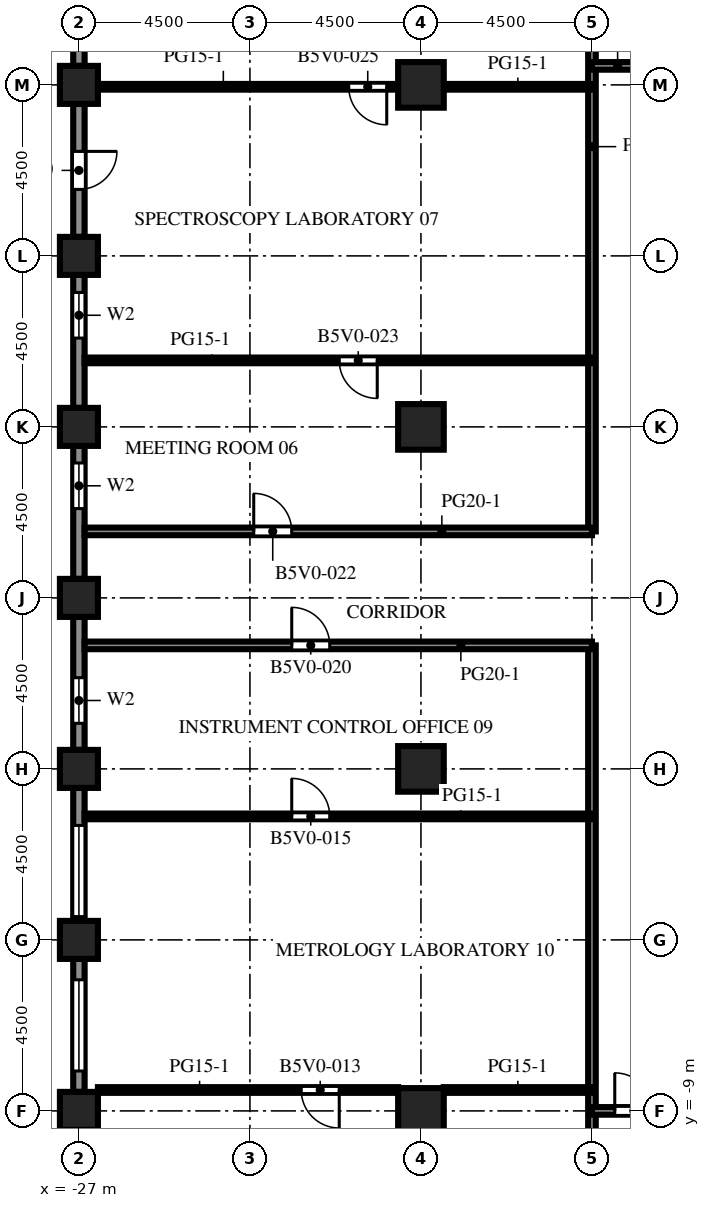
"""IFC4 building model, lengths in metres.
Left out: names, types, materials, properties, quantities, classifications, styles, units other than length and angle.
Written with IfcOpenShell. Run it as: python <this file> out.ifc"""

import sys

from ifc_helpers import new_model, si_unit, direction, frame, frame_2d, origin, origin_2d, place, context, subcontext, project, spatial, rectangle, extrude, element, fill, save


model = new_model("IFC4")
c1 = context("Model", 3, precision=1e-05, world=origin(), true_north=direction((0.0, 1.0)))
c2 = subcontext(c1, "Body", "Model", "MODEL_VIEW")
j1 = project(units=[si_unit("LENGTHUNIT", "METRE"), si_unit("PLANEANGLEUNIT", "RADIAN")], contexts=[c1])
p1 = place(None, origin())
s1 = spatial("IfcSite", under=j1, at=p1, CompositionType="ELEMENT")
p2 = place(p1, origin())
s2 = spatial("IfcBuilding", under=s1, at=p2, CompositionType="ELEMENT")
p3 = place(p2, frame((0.0, 0.0, 160.9)))
s3 = spatial("IfcBuildingStorey", under=s2, at=p3, CompositionType="ELEMENT", Elevation=160.9)
for number, where, z_axis, x_axis in (
    (1, (-27.0, -9.0, 0.0), (0.0, 0.0, 1.0), (1.0, 0.0, 0.0)),
    (2, (-27.0, -4.5, 0.0), (0.0, 0.0, 1.0), (1.0, 0.0, 0.0)),
    (3, (-27.0, 0.0, 0.0), (0.0, 0.0, 1.0), (1.0, 0.0, 0.0)),
    (4, (-27.0, 4.5, 0.0), (0.0, 0.0, 1.0), (1.0, 0.0, 0.0)),
    (5, (-27.0, 9.0, 0.0), (0.0, 0.0, 1.0), (1.0, 0.0, 0.0)),
    (6, (-27.0, 13.5, 0.0), (0.0, 0.0, 1.0), (1.0, 0.0, 0.0)),
    (7, (-27.0, 18.0, 0.0), (0.0, 0.0, 1.0), (1.0, 0.0, 0.0)),
):
    element("IfcColumn", number, at=place(p3, frame(where, z_axis=z_axis, x_axis=x_axis)), inside=s3, PredefinedType="COLUMN", context=c2, shape_type="SweptSolid", body=[
        extrude(rectangle(XDim=1.0, YDim=1.0, at=origin_2d()), origin(), (0.0, 0.0, 1.0), 4.1),
    ])
for number, where, z_axis, x_axis in (
    (8, (-18.0, -9.0, 0.0), (0.0, 0.0, 1.0), (1.0, 0.0, 0.0)),
    (9, (-18.0, 0.0, 0.0), (0.0, 0.0, 1.0), (1.0, 0.0, 0.0)),
    (10, (-18.0, 9.0, 0.0), (0.0, 0.0, 1.0), (1.0, 0.0, 0.0)),
    (11, (-18.0, 18.0, 0.0), (0.0, 0.0, 1.0), (1.0, 0.0, 0.0)),
):
    element("IfcColumn", number, at=place(p3, frame(where, z_axis=z_axis, x_axis=x_axis)), inside=s3, PredefinedType="COLUMN", context=c2, shape_type="SweptSolid", body=[
        extrude(rectangle(XDim=1.2, YDim=1.2, at=origin_2d()), origin(), (0.0, 0.0, 1.0), 4.1),
    ])
p4 = place(p3, frame((-27.0, 18.5, 0.0), z_axis=(0.0, 0.0, 1.0), x_axis=(0.0, 1.0, 0.0)))
e12 = element("IfcWall", 12, at=p4, inside=s3, PredefinedType="SOLIDWALL", context=c2, shape_type="SweptSolid", body=[
    extrude(rectangle(XDim=3.5, YDim=0.3, at=frame_2d((1.75, 0.0))), origin(), (0.0, 0.0, 1.0), 2.85),
])
p5 = place(p4, frame((0.55, 0.0, 0.8)))
e13 = element("IfcOpeningElement", 13, at=p5, cuts=e12, PredefinedType="OPENING", context=c2, shape_type="SweptSolid", body=[
    extrude(rectangle(XDim=2.4, YDim=1.7, at=frame_2d((1.2, 0.85))), frame((0.0, 0.16, 0.0), z_axis=(0.0, -1.0, 0.0), x_axis=(1.0, 0.0, 0.0)), (0.0, 0.0, 1.0), 0.32),
])
p6 = place(p3, frame((-27.0, 14.0, 0.0), z_axis=(0.0, 0.0, 1.0), x_axis=(0.0, 1.0, 0.0)))
e14 = element("IfcWall", 14, at=p6, inside=s3, PredefinedType="SOLIDWALL", context=c2, shape_type="SweptSolid", body=[
    extrude(rectangle(XDim=3.5, YDim=0.3, at=frame_2d((1.75, 0.0))), origin(), (0.0, 0.0, 1.0), 2.85),
])
p7 = place(p6, frame((1.25, 0.0, 0.0)))
e15 = element("IfcOpeningElement", 15, at=p7, cuts=e14, PredefinedType="OPENING", context=c2, shape_type="SweptSolid", body=[
    extrude(rectangle(XDim=1.0, YDim=2.2, at=frame_2d((0.5, 1.1))), frame((0.0, 0.16, 0.0), z_axis=(0.0, -1.0, 0.0), x_axis=(1.0, 0.0, 0.0)), (0.0, 0.0, 1.0), 0.32),
])
p8 = place(p3, frame((-27.0, 9.5, 0.0), z_axis=(0.0, 0.0, 1.0), x_axis=(0.0, 1.0, 0.0)))
e16 = element("IfcWall", 16, at=p8, inside=s3, PredefinedType="SOLIDWALL", context=c2, shape_type="SweptSolid", body=[
    extrude(rectangle(XDim=3.5, YDim=0.3, at=frame_2d((1.75, 0.0))), origin(), (0.0, 0.0, 1.0), 2.85),
])
p9 = place(p8, frame((1.837, 0.0, 0.8)))
e17 = element("IfcOpeningElement", 17, at=p9, cuts=e16, PredefinedType="OPENING", context=c2, shape_type="SweptSolid", body=[
    extrude(rectangle(XDim=1.2, YDim=1.7, at=frame_2d((0.6, 0.85))), frame((0.0, 0.16, 0.0), z_axis=(0.0, -1.0, 0.0), x_axis=(1.0, 0.0, 0.0)), (0.0, 0.0, 1.0), 0.32),
])
p10 = place(p3, frame((-27.0, 5.0, 0.0), z_axis=(0.0, 0.0, 1.0), x_axis=(0.0, 1.0, 0.0)))
e18 = element("IfcWall", 18, at=p10, inside=s3, PredefinedType="SOLIDWALL", context=c2, shape_type="SweptSolid", body=[
    extrude(rectangle(XDim=3.5, YDim=0.3, at=frame_2d((1.75, 0.0))), origin(), (0.0, 0.0, 1.0), 2.85),
])
p11 = place(p10, frame((1.85, 0.0, 0.8)))
e19 = element("IfcOpeningElement", 19, at=p11, cuts=e18, PredefinedType="OPENING", context=c2, shape_type="SweptSolid", body=[
    extrude(rectangle(XDim=1.2, YDim=1.7, at=frame_2d((0.6, 0.85))), frame((0.0, 0.16, 0.0), z_axis=(0.0, -1.0, 0.0), x_axis=(1.0, 0.0, 0.0)), (0.0, 0.0, 1.0), 0.32),
])
p12 = place(p3, frame((-27.0, 0.5, 0.0), z_axis=(0.0, 0.0, 1.0), x_axis=(0.0, 1.0, 0.0)))
e20 = element("IfcWall", 20, at=p12, inside=s3, PredefinedType="SOLIDWALL", context=c2, shape_type="SweptSolid", body=[
    extrude(rectangle(XDim=3.5, YDim=0.3, at=frame_2d((1.75, 0.0))), origin(), (0.0, 0.0, 1.0), 2.85),
])
p13 = place(p12, frame((0.7, 0.0, 0.8)))
e21 = element("IfcOpeningElement", 21, at=p13, cuts=e20, PredefinedType="OPENING", context=c2, shape_type="SweptSolid", body=[
    extrude(rectangle(XDim=1.2, YDim=1.7, at=frame_2d((0.6, 0.85))), frame((0.0, 0.16, 0.0), z_axis=(0.0, -1.0, 0.0), x_axis=(1.0, 0.0, 0.0)), (0.0, 0.0, 1.0), 0.32),
])
p14 = place(p3, frame((-27.0, -4.0, 0.0), z_axis=(0.0, 0.0, 1.0), x_axis=(0.0, 1.0, 0.0)))
e22 = element("IfcWall", 22, at=p14, inside=s3, PredefinedType="SOLIDWALL", context=c2, shape_type="SweptSolid", body=[
    extrude(rectangle(XDim=3.5, YDim=0.3, at=frame_2d((1.75, 0.0))), origin(), (0.0, 0.0, 1.0), 2.85),
])
p15 = place(p14, frame((0.113, 0.0, 0.8)))
e23 = element("IfcOpeningElement", 23, at=p15, cuts=e22, PredefinedType="OPENING", context=c2, shape_type="SweptSolid", body=[
    extrude(rectangle(XDim=2.4, YDim=1.7, at=frame_2d((1.2, 0.85))), frame((0.0, 0.16, 0.0), z_axis=(0.0, -1.0, 0.0), x_axis=(1.0, 0.0, 0.0)), (0.0, 0.0, 1.0), 0.32),
])
p16 = place(p3, frame((-27.0, -8.5, 0.0), z_axis=(0.0, 0.0, 1.0), x_axis=(0.0, 1.0, 0.0)))
e24 = element("IfcWall", 24, at=p16, inside=s3, PredefinedType="SOLIDWALL", context=c2, shape_type="SweptSolid", body=[
    extrude(rectangle(XDim=3.5, YDim=0.3, at=frame_2d((1.75, 0.0))), origin(), (0.0, 0.0, 1.0), 2.85),
])
p17 = place(p16, frame((0.55, 0.0, 0.8)))
e25 = element("IfcOpeningElement", 25, at=p17, cuts=e24, PredefinedType="OPENING", context=c2, shape_type="SweptSolid", body=[
    extrude(rectangle(XDim=2.4, YDim=1.7, at=frame_2d((1.2, 0.85))), frame((0.0, 0.16, 0.0), z_axis=(0.0, -1.0, 0.0), x_axis=(1.0, 0.0, 0.0)), (0.0, 0.0, 1.0), 0.32),
])
p18 = place(p3, frame((-13.5, -26.5, 0.0), z_axis=(0.0, 0.0, 1.0), x_axis=(0.0, 1.0, 0.0)))
e26 = element("IfcWall", 26, at=p18, inside=s3, PredefinedType="PARTITIONING", context=c2, shape_type="SweptSolid", body=[
    extrude(rectangle(XDim=29.75, YDim=0.2, at=frame_2d((14.875, 0.0))), origin(), (0.0, 0.0, 1.0), 3.65),
])
p19 = place(p3, frame((-13.5, 6.25, 0.0), z_axis=(0.0, 0.0, 1.0), x_axis=(0.0, 1.0, 0.0)))
e27 = element("IfcWall", 27, at=p19, inside=s3, PredefinedType="PARTITIONING", context=c2, shape_type="SweptSolid", body=[
    extrude(rectangle(XDim=20.25, YDim=0.2, at=frame_2d((10.125, 0.0))), origin(), (0.0, 0.0, 1.0), 3.65),
])
p20 = place(p3, frame((-10.5, -9.0, 0.0), z_axis=(0.0, 0.0, 1.0), x_axis=(-1.0, 0.0, 0.0)))
e28 = element("IfcWall", 28, at=p20, inside=s3, PredefinedType="PARTITIONING", context=c2, shape_type="SweptSolid", body=[
    extrude(rectangle(XDim=3.0, YDim=0.2, at=frame_2d((1.5, 0.0))), origin(), (0.0, 0.0, 1.0), 3.65),
])
p21 = place(p20, frame((1.4, 0.0, 0.0)))
e29 = element("IfcOpeningElement", 29, at=p21, cuts=e28, PredefinedType="OPENING", context=c2, shape_type="SweptSolid", body=[
    extrude(rectangle(XDim=1.0, YDim=2.1, at=frame_2d((0.5, 1.05))), frame((0.0, 0.11, 0.0), z_axis=(0.0, -1.0, 0.0), x_axis=(1.0, 0.0, 0.0)), (0.0, 0.0, 1.0), 0.22),
])
p22 = place(p3, frame((-18.6, -8.45, 0.0), z_axis=(0.0, 0.0, 1.0), x_axis=(-1.0, 0.0, 0.0)))
e30 = element("IfcWall", 30, at=p22, inside=s3, PredefinedType="PARTITIONING", context=c2, shape_type="SweptSolid", body=[
    extrude(rectangle(XDim=7.9, YDim=0.15, at=frame_2d((3.95, 0.0))), origin(), (0.0, 0.0, 1.0), 3.65),
])
p23 = place(p22, frame((1.55, 0.0, 0.0)))
e31 = element("IfcOpeningElement", 31, at=p23, cuts=e30, PredefinedType="OPENING", context=c2, shape_type="SweptSolid", body=[
    extrude(rectangle(XDim=1.0, YDim=2.1, at=frame_2d((0.5, 1.05))), frame((0.0, 0.085, 0.0), z_axis=(0.0, -1.0, 0.0), x_axis=(1.0, 0.0, 0.0)), (0.0, 0.0, 1.0), 0.17),
])
p24 = place(p3, frame((-17.4, -8.45, 0.0), z_axis=(0.0, 0.0, 1.0), x_axis=(1.0, 0.0, 0.0)))
e32 = element("IfcWall", 32, at=p24, inside=s3, PredefinedType="PARTITIONING", context=c2, shape_type="SweptSolid", body=[
    extrude(rectangle(XDim=3.9, YDim=0.15, at=frame_2d((1.95, 0.0))), origin(), (0.0, 0.0, 1.0), 3.65),
])
p25 = place(p3, frame((-13.5, -1.25, 0.0), z_axis=(0.0, 0.0, 1.0), x_axis=(-1.0, 0.0, 0.0)))
e33 = element("IfcWall", 33, at=p25, inside=s3, PredefinedType="PARTITIONING", context=c2, shape_type="SweptSolid", body=[
    extrude(rectangle(XDim=13.35, YDim=0.15, at=frame_2d((6.675, 0.0))), origin(), (0.0, 0.0, 1.0), 3.65),
])
p26 = place(p25, frame((6.9, 0.0, 0.0)))
e34 = element("IfcOpeningElement", 34, at=p26, cuts=e33, PredefinedType="OPENING", context=c2, shape_type="SweptSolid", body=[
    extrude(rectangle(XDim=1.0, YDim=2.1, at=frame_2d((0.5, 1.05))), frame((0.0, 0.085, 0.0), z_axis=(0.0, -1.0, 0.0), x_axis=(1.0, 0.0, 0.0)), (0.0, 0.0, 1.0), 0.17),
])
p27 = place(p3, frame((-13.5, 3.25, 0.0), z_axis=(0.0, 0.0, 1.0), x_axis=(-1.0, 0.0, 0.0)))
e35 = element("IfcWall", 35, at=p27, inside=s3, PredefinedType="PARTITIONING", context=c2, shape_type="SweptSolid", body=[
    extrude(rectangle(XDim=13.35, YDim=0.2, at=frame_2d((6.675, 0.0))), origin(), (0.0, 0.0, 1.0), 3.65),
])
p28 = place(p27, frame((6.9, 0.0, 0.0)))
e36 = element("IfcOpeningElement", 36, at=p28, cuts=e35, PredefinedType="OPENING", context=c2, shape_type="SweptSolid", body=[
    extrude(rectangle(XDim=1.0, YDim=2.1, at=frame_2d((0.5, 1.05))), frame((0.0, 0.11, 0.0), z_axis=(0.0, -1.0, 0.0), x_axis=(1.0, 0.0, 0.0)), (0.0, 0.0, 1.0), 0.22),
])
p29 = place(p3, frame((-26.85, 6.25, 0.0), z_axis=(0.0, 0.0, 1.0), x_axis=(1.0, 0.0, 0.0)))
e37 = element("IfcWall", 37, at=p29, inside=s3, PredefinedType="PARTITIONING", context=c2, shape_type="SweptSolid", body=[
    extrude(rectangle(XDim=13.35, YDim=0.2, at=frame_2d((6.675, 0.0))), origin(), (0.0, 0.0, 1.0), 3.65),
])
p30 = place(p29, frame((4.45, 0.0, 0.0)))
e38 = element("IfcOpeningElement", 38, at=p30, cuts=e37, PredefinedType="OPENING", context=c2, shape_type="SweptSolid", body=[
    extrude(rectangle(XDim=1.0, YDim=2.1, at=frame_2d((0.5, 1.05))), frame((0.0, 0.11, 0.0), z_axis=(0.0, -1.0, 0.0), x_axis=(1.0, 0.0, 0.0)), (0.0, 0.0, 1.0), 0.22),
])
p31 = place(p3, frame((-26.85, 10.75, 0.0), z_axis=(0.0, 0.0, 1.0), x_axis=(1.0, 0.0, 0.0)))
e39 = element("IfcWall", 39, at=p31, inside=s3, PredefinedType="PARTITIONING", context=c2, shape_type="SweptSolid", body=[
    extrude(rectangle(XDim=13.35, YDim=0.15, at=frame_2d((6.675, 0.0))), origin(), (0.0, 0.0, 1.0), 3.65),
])
p32 = place(p31, frame((6.7, 0.0, 0.0)))
e40 = element("IfcOpeningElement", 40, at=p32, cuts=e39, PredefinedType="OPENING", context=c2, shape_type="SweptSolid", body=[
    extrude(rectangle(XDim=1.0, YDim=2.1, at=frame_2d((0.5, 1.05))), frame((0.0, 0.085, 0.0), z_axis=(0.0, -1.0, 0.0), x_axis=(1.0, 0.0, 0.0)), (0.0, 0.0, 1.0), 0.17),
])
p33 = place(p3, frame((-26.5, 17.95, 0.0), z_axis=(0.0, 0.0, 1.0), x_axis=(1.0, 0.0, 0.0)))
e41 = element("IfcWall", 41, at=p33, inside=s3, PredefinedType="PARTITIONING", context=c2, shape_type="SweptSolid", body=[
    extrude(rectangle(XDim=7.9, YDim=0.15, at=frame_2d((3.95, 0.0))), origin(), (0.0, 0.0, 1.0), 3.65),
])
p34 = place(p33, frame((6.6, 0.0, 0.0)))
e42 = element("IfcOpeningElement", 42, at=p34, cuts=e41, PredefinedType="OPENING", context=c2, shape_type="SweptSolid", body=[
    extrude(rectangle(XDim=1.0, YDim=2.1, at=frame_2d((0.5, 1.05))), frame((0.0, 0.085, 0.0), z_axis=(0.0, -1.0, 0.0), x_axis=(1.0, 0.0, 0.0)), (0.0, 0.0, 1.0), 0.17),
])
p35 = place(p3, frame((-17.4, 17.95, 0.0), z_axis=(0.0, 0.0, 1.0), x_axis=(1.0, 0.0, 0.0)))
e43 = element("IfcWall", 43, at=p35, inside=s3, PredefinedType="PARTITIONING", context=c2, shape_type="SweptSolid", body=[
    extrude(rectangle(XDim=3.9, YDim=0.15, at=frame_2d((1.95, 0.0))), origin(), (0.0, 0.0, 1.0), 3.65),
])
p36 = place(p3, frame((-13.5, 18.5, 0.0), z_axis=(0.0, 0.0, 1.0), x_axis=(1.0, 0.0, 0.0)))
e44 = element("IfcWall", 44, at=p36, inside=s3, PredefinedType="PARTITIONING", context=c2, shape_type="SweptSolid", body=[
    extrude(rectangle(XDim=3.0, YDim=0.2, at=frame_2d((1.5, 0.0))), origin(), (0.0, 0.0, 1.0), 3.65),
])
p37 = place(p36, frame((1.35, 0.0, 0.0)))
e45 = element("IfcOpeningElement", 45, at=p37, cuts=e44, PredefinedType="OPENING", context=c2, shape_type="SweptSolid", body=[
    extrude(rectangle(XDim=1.0, YDim=2.1, at=frame_2d((0.5, 1.05))), frame((0.0, 0.11, 0.0), z_axis=(0.0, -1.0, 0.0), x_axis=(1.0, 0.0, 0.0)), (0.0, 0.0, 1.0), 0.22),
])
p38 = place(p7, origin())
e46 = element("IfcDoor", 46, at=p38, inside=s3, OperationType="SINGLE_SWING_RIGHT", PredefinedType="DOOR", context=c2, shape_type="SweptSolid", body=[
    extrude(rectangle(XDim=1.0, YDim=2.2, at=frame_2d((0.5, 1.1))), frame((0.0, 0.025, 0.0), z_axis=(0.0, -1.0, 0.0), x_axis=(1.0, 0.0, 0.0)), (0.0, 0.0, 1.0), 0.05),
])
fill(e15, e46)
p39 = place(p9, origin())
e47 = element("IfcWindow", 47, at=p39, inside=s3, PartitioningType="SINGLE_PANEL", PredefinedType="WINDOW", context=c2, shape_type="SweptSolid", body=[
    extrude(rectangle(XDim=1.2, YDim=1.7, at=frame_2d((0.6, 0.85))), frame((0.0, 0.03, 0.0), z_axis=(0.0, -1.0, 0.0), x_axis=(1.0, 0.0, 0.0)), (0.0, 0.0, 1.0), 0.06),
])
fill(e17, e47)
p40 = place(p11, origin())
e48 = element("IfcWindow", 48, at=p40, inside=s3, PartitioningType="SINGLE_PANEL", PredefinedType="WINDOW", context=c2, shape_type="SweptSolid", body=[
    extrude(rectangle(XDim=1.2, YDim=1.7, at=frame_2d((0.6, 0.85))), frame((0.0, 0.03, 0.0), z_axis=(0.0, -1.0, 0.0), x_axis=(1.0, 0.0, 0.0)), (0.0, 0.0, 1.0), 0.06),
])
fill(e19, e48)
p41 = place(p13, origin())
e49 = element("IfcWindow", 49, at=p41, inside=s3, PartitioningType="SINGLE_PANEL", PredefinedType="WINDOW", context=c2, shape_type="SweptSolid", body=[
    extrude(rectangle(XDim=1.2, YDim=1.7, at=frame_2d((0.6, 0.85))), frame((0.0, 0.03, 0.0), z_axis=(0.0, -1.0, 0.0), x_axis=(1.0, 0.0, 0.0)), (0.0, 0.0, 1.0), 0.06),
])
fill(e21, e49)
p42 = place(p15, origin())
e50 = element("IfcWindow", 50, at=p42, inside=s3, PartitioningType="SINGLE_PANEL", PredefinedType="WINDOW", context=c2, shape_type="SweptSolid", body=[
    extrude(rectangle(XDim=2.4, YDim=1.7, at=frame_2d((1.2, 0.85))), frame((0.0, 0.03, 0.0), z_axis=(0.0, -1.0, 0.0), x_axis=(1.0, 0.0, 0.0)), (0.0, 0.0, 1.0), 0.06),
])
fill(e23, e50)
p43 = place(p17, origin())
e51 = element("IfcWindow", 51, at=p43, inside=s3, PartitioningType="SINGLE_PANEL", PredefinedType="WINDOW", context=c2, shape_type="SweptSolid", body=[
    extrude(rectangle(XDim=2.4, YDim=1.7, at=frame_2d((1.2, 0.85))), frame((0.0, 0.03, 0.0), z_axis=(0.0, -1.0, 0.0), x_axis=(1.0, 0.0, 0.0)), (0.0, 0.0, 1.0), 0.06),
])
fill(e25, e51)
p44 = place(p21, origin())
e52 = element("IfcDoor", 52, at=p44, inside=s3, OperationType="SINGLE_SWING_RIGHT", PredefinedType="DOOR", context=c2, shape_type="SweptSolid", body=[
    extrude(rectangle(XDim=1.0, YDim=2.1, at=frame_2d((0.5, 1.05))), frame((0.0, 0.025, 0.0), z_axis=(0.0, -1.0, 0.0), x_axis=(1.0, 0.0, 0.0)), (0.0, 0.0, 1.0), 0.05),
])
fill(e29, e52)
p45 = place(p23, origin())
e53 = element("IfcDoor", 53, at=p45, inside=s3, OperationType="SINGLE_SWING_LEFT", PredefinedType="DOOR", context=c2, shape_type="SweptSolid", body=[
    extrude(rectangle(XDim=1.0, YDim=2.1, at=frame_2d((0.5, 1.05))), frame((0.0, 0.025, 0.0), z_axis=(0.0, -1.0, 0.0), x_axis=(1.0, 0.0, 0.0)), (0.0, 0.0, 1.0), 0.05),
])
fill(e31, e53)
p46 = place(p26, origin())
e54 = element("IfcDoor", 54, at=p46, inside=s3, OperationType="SINGLE_SWING_RIGHT", PredefinedType="DOOR", context=c2, shape_type="SweptSolid", body=[
    extrude(rectangle(XDim=1.0, YDim=2.1, at=frame_2d((0.5, 1.05))), frame((0.0, 0.025, 0.0), z_axis=(0.0, -1.0, 0.0), x_axis=(1.0, 0.0, 0.0)), (0.0, 0.0, 1.0), 0.05),
])
fill(e34, e54)
p47 = place(p28, origin())
e55 = element("IfcDoor", 55, at=p47, inside=s3, OperationType="SINGLE_SWING_RIGHT", PredefinedType="DOOR", context=c2, shape_type="SweptSolid", body=[
    extrude(rectangle(XDim=1.0, YDim=2.1, at=frame_2d((0.5, 1.05))), frame((0.0, 0.025, 0.0), z_axis=(0.0, -1.0, 0.0), x_axis=(1.0, 0.0, 0.0)), (0.0, 0.0, 1.0), 0.05),
])
fill(e36, e55)
p48 = place(p30, origin())
e56 = element("IfcDoor", 56, at=p48, inside=s3, OperationType="SINGLE_SWING_LEFT", PredefinedType="DOOR", context=c2, shape_type="SweptSolid", body=[
    extrude(rectangle(XDim=1.0, YDim=2.1, at=frame_2d((0.5, 1.05))), frame((0.0, 0.025, 0.0), z_axis=(0.0, -1.0, 0.0), x_axis=(1.0, 0.0, 0.0)), (0.0, 0.0, 1.0), 0.05),
])
fill(e38, e56)
p49 = place(p32, origin())
e57 = element("IfcDoor", 57, at=p49, inside=s3, OperationType="SINGLE_SWING_RIGHT", PredefinedType="DOOR", context=c2, shape_type="SweptSolid", body=[
    extrude(rectangle(XDim=1.0, YDim=2.1, at=frame_2d((0.5, 1.05))), frame((0.0, 0.025, 0.0), z_axis=(0.0, -1.0, 0.0), x_axis=(1.0, 0.0, 0.0)), (0.0, 0.0, 1.0), 0.05),
])
fill(e40, e57)
p50 = place(p34, origin())
e58 = element("IfcDoor", 58, at=p50, inside=s3, OperationType="SINGLE_SWING_RIGHT", PredefinedType="DOOR", context=c2, shape_type="SweptSolid", body=[
    extrude(rectangle(XDim=1.0, YDim=2.1, at=frame_2d((0.5, 1.05))), frame((0.0, 0.025, 0.0), z_axis=(0.0, -1.0, 0.0), x_axis=(1.0, 0.0, 0.0)), (0.0, 0.0, 1.0), 0.05),
])
fill(e42, e58)
save(model, sys.argv[1])
